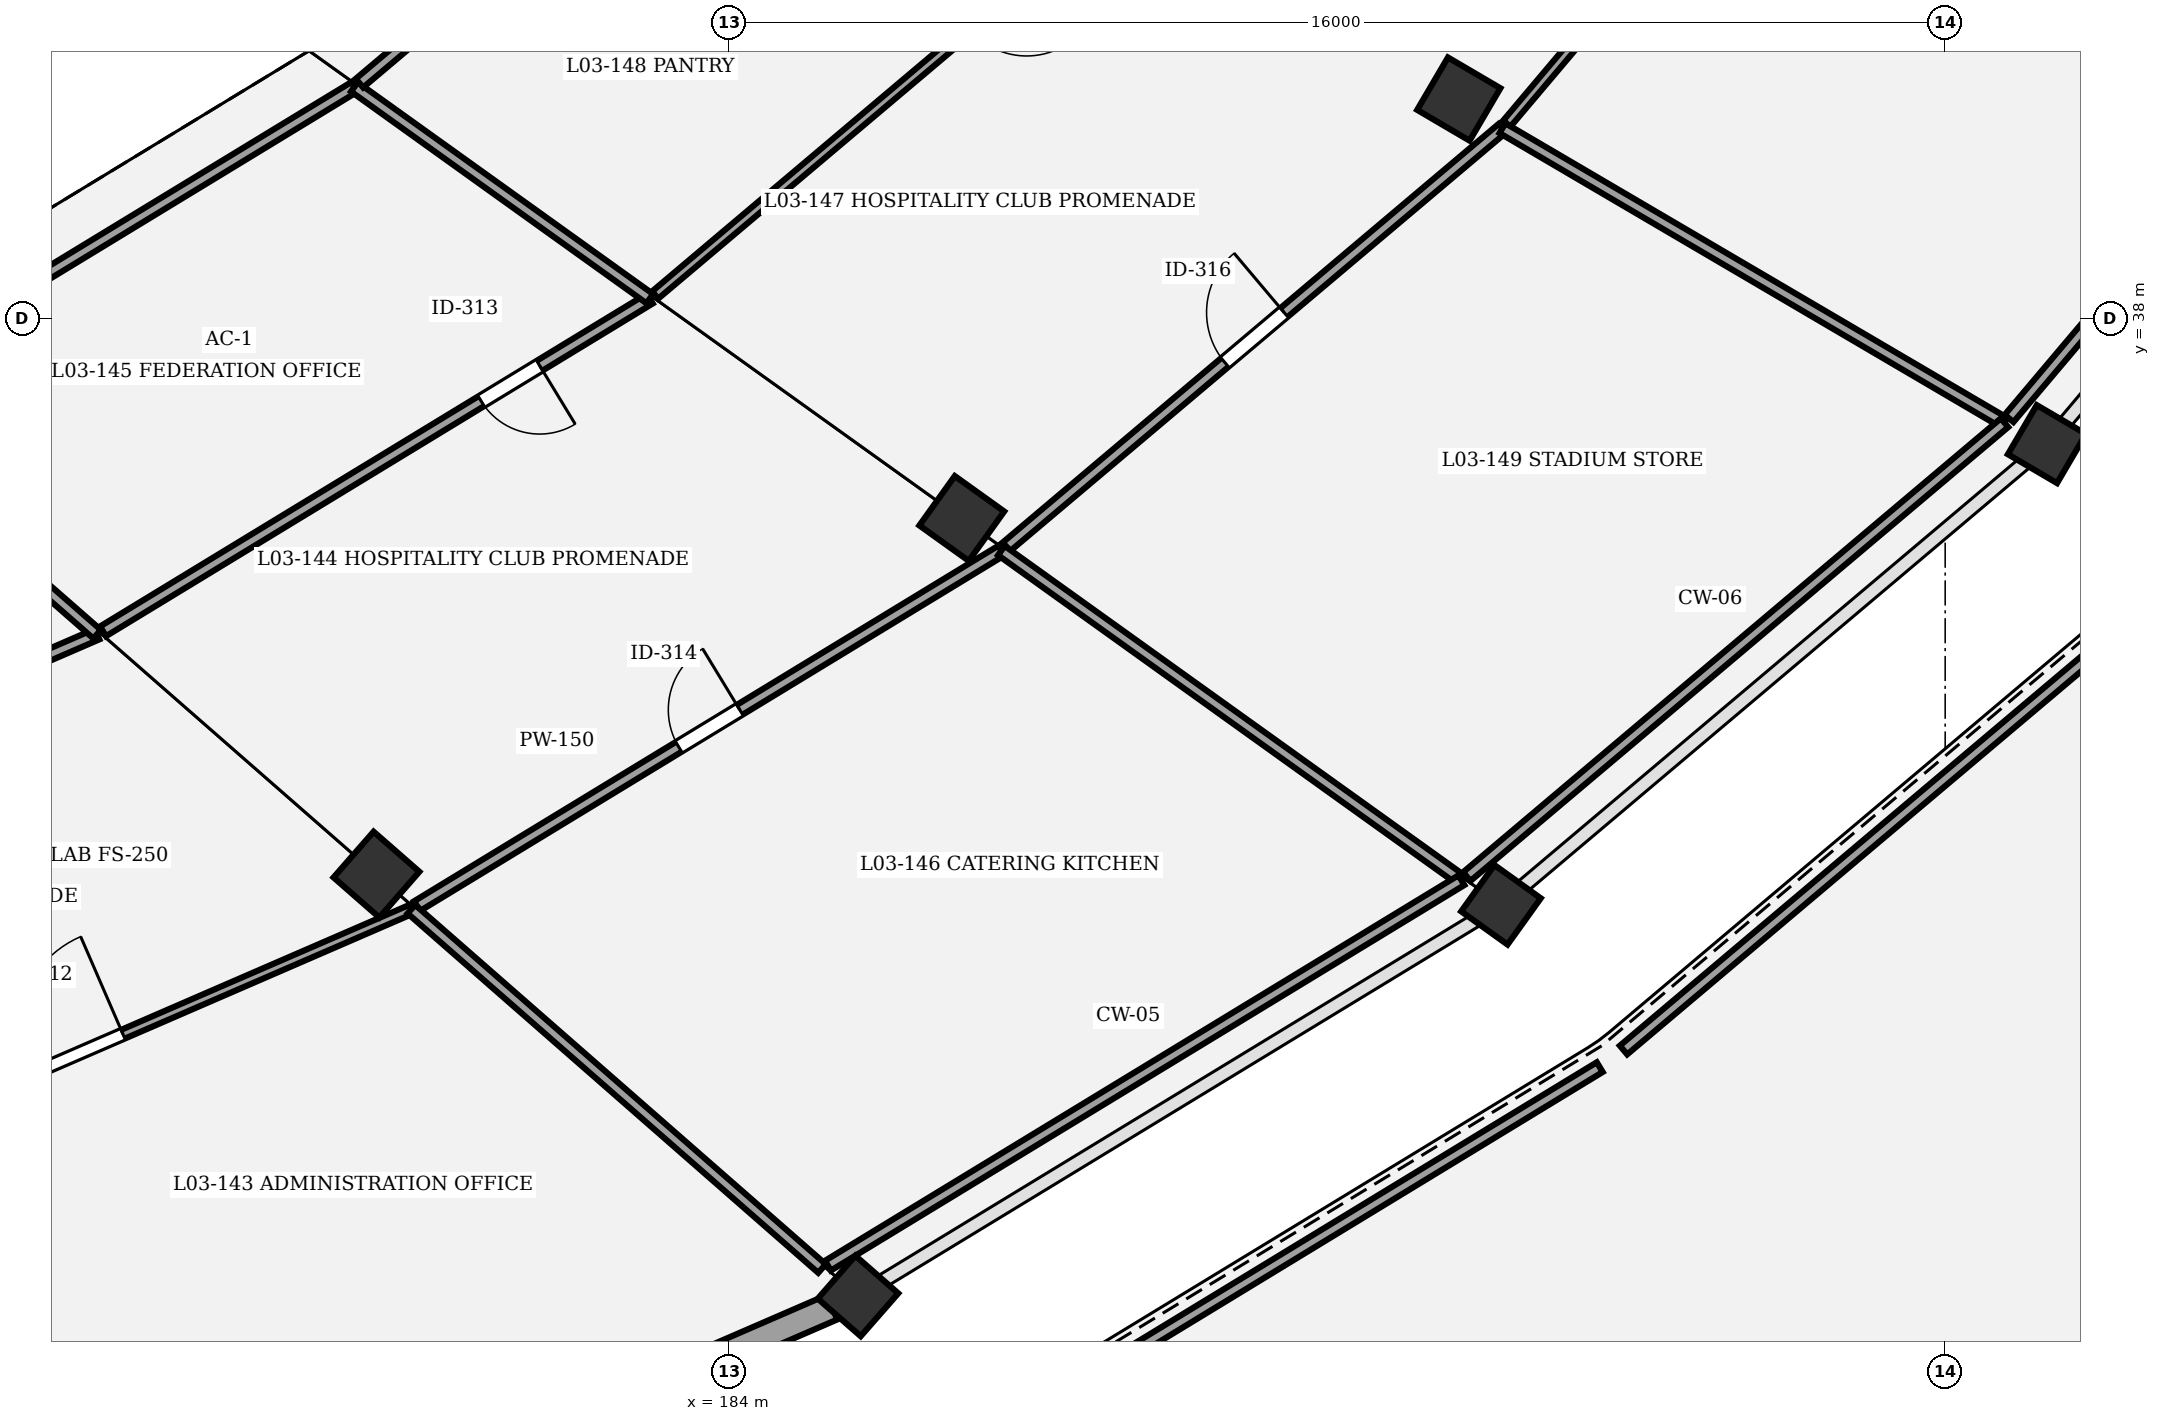
"""IFC4 building model, lengths in metres.
Left out: names, types, materials, properties, quantities, classifications, styles, units other than length and angle.
Written with IfcOpenShell. Run it as: python <this file> out.ifc"""

import sys

from ifc_helpers import new_model, si_unit, direction, frame, frame_2d, origin, origin_2d, place, context, subcontext, project, spatial, rectangle, extrude, element, fill, save


model = new_model("IFC4")
c1 = context("Model", 3, precision=1e-05, world=origin(), true_north=direction((0.0, 1.0)))
c2 = subcontext(c1, "Body", "Model", "MODEL_VIEW")
j1 = project(units=[si_unit("LENGTHUNIT", "METRE"), si_unit("PLANEANGLEUNIT", "RADIAN")], contexts=[c1])
p1 = place(None, origin())
s1 = spatial("IfcSite", under=j1, at=p1, CompositionType="ELEMENT")
p2 = place(p1, origin())
s2 = spatial("IfcBuilding", under=s1, at=p2, CompositionType="ELEMENT")
p3 = place(p2, frame((0.0, 0.0, 14.7)))
s3 = spatial("IfcBuildingStorey", under=s2, at=p3, CompositionType="ELEMENT", Elevation=14.7)
p4 = place(p3, frame((179.36, 30.683, 0.0), z_axis=(0.0, 0.0, 1.0), x_axis=(0.752529860433, -0.658558128912, 0.0)))
e1 = element("IfcColumn", 1, at=p4, inside=s3, PredefinedType="COLUMN", context=c2, shape_type="SweptSolid", body=[
    extrude(rectangle(XDim=0.8, YDim=0.8, at=origin_2d()), origin(), (0.0, 0.0, 1.0), 4.5),
])
p5 = place(p3, frame((185.696, 25.139, 0.0), z_axis=(0.0, 0.0, 1.0), x_axis=(0.752529860433, -0.658558128912, 0.0)))
e2 = element("IfcColumn", 2, at=p5, inside=s3, PredefinedType="COLUMN", context=c2, shape_type="SweptSolid", body=[
    extrude(rectangle(XDim=0.75, YDim=0.75, at=origin_2d()), origin(), (0.0, 0.0, 1.0), 4.5),
])
p6 = place(p3, frame((187.061, 35.368, 0.0), z_axis=(0.0, 0.0, 1.0), x_axis=(0.812897512265, -0.582406760395, 0.0)))
e3 = element("IfcColumn", 3, at=p6, inside=s3, PredefinedType="COLUMN", context=c2, shape_type="SweptSolid", body=[
    extrude(rectangle(XDim=0.8, YDim=0.8, at=origin_2d()), origin(), (0.0, 0.0, 1.0), 4.5),
])
p7 = place(p3, frame((194.156, 30.285, 0.0), z_axis=(0.0, 0.0, 1.0), x_axis=(0.812897512265, -0.582406760395, 0.0)))
e4 = element("IfcColumn", 4, at=p7, inside=s3, PredefinedType="COLUMN", context=c2, shape_type="SweptSolid", body=[
    extrude(rectangle(XDim=0.75, YDim=0.75, at=origin_2d()), origin(), (0.0, 0.0, 1.0), 4.5),
])
p8 = place(p3, frame((193.6, 40.886, 0.0), z_axis=(0.0, 0.0, 1.0), x_axis=(0.862513669207, -0.506033764121, 0.0)))
e5 = element("IfcColumn", 5, at=p8, inside=s3, PredefinedType="COLUMN", context=c2, shape_type="SweptSolid", body=[
    extrude(rectangle(XDim=0.8, YDim=0.8, at=origin_2d()), origin(), (0.0, 0.0, 1.0), 4.5),
])
p9 = place(p3, frame((201.338, 36.346, 0.0), z_axis=(0.0, 0.0, 1.0), x_axis=(0.862513669207, -0.506033764121, 0.0)))
e6 = element("IfcColumn", 6, at=p9, inside=s3, PredefinedType="COLUMN", context=c2, shape_type="SweptSolid", body=[
    extrude(rectangle(XDim=0.75, YDim=0.75, at=origin_2d()), origin(), (0.0, 0.0, 1.0), 4.5),
])
p10 = place(p3, frame((185.354, 24.991, 0.0), z_axis=(0.0, 0.0, 1.0), x_axis=(-0.917502782842, -0.397729359587, 0.0)))
e7 = element("IfcWall", 7, at=p10, inside=s3, PredefinedType="STANDARD", context=c2, shape_type="SweptSolid", body=[
    extrude(rectangle(XDim=9.89, YDim=0.35, at=frame_2d((4.945, 0.0))), origin(), (0.0, 0.0, 1.0), 3.42),
])
p11 = place(p10, frame((4.045, 0.0, 0.0)))
e8 = element("IfcOpeningElement", 8, at=p11, cuts=e7, PredefinedType="OPENING", context=c2, shape_type="SweptSolid", body=[
    extrude(rectangle(XDim=1.8, YDim=2.4, at=frame_2d((0.9, 1.2))), frame((0.0, 0.185, 0.0), z_axis=(0.0, -1.0, 0.0), x_axis=(1.0, 0.0, 0.0)), (0.0, 0.0, 1.0), 0.37),
])
p12 = place(p3, frame((175.685, 33.846, 0.0), z_axis=(0.0, 0.0, 1.0), x_axis=(-0.917494590455, -0.397748257677, 0.0)))
e9 = element("IfcWall", 9, at=p12, inside=s3, PredefinedType="PARTITIONING", context=c2, shape_type="SweptSolid", body=[
    extrude(rectangle(XDim=9.049, YDim=0.15, at=frame_2d((4.525, 0.0))), origin(), (0.0, 0.0, 1.0), 3.25),
])
p13 = place(p12, frame((1.738, 0.0, 0.0)))
e10 = element("IfcOpeningElement", 10, at=p13, cuts=e9, PredefinedType="OPENING", context=c2, shape_type="SweptSolid", body=[
    extrude(rectangle(XDim=1.32, YDim=2.2, at=frame_2d((0.66, 1.1))), frame((0.0, 0.085, 0.0), z_axis=(0.0, -1.0, 0.0), x_axis=(1.0, 0.0, 0.0)), (0.0, 0.0, 1.0), 0.17),
])
p14 = place(p3, frame((170.946, 26.381, 0.0), z_axis=(0.0, 0.0, 1.0), x_axis=(0.917508957037, 0.39771511633, 0.0)))
e11 = element("IfcWall", 11, at=p14, inside=s3, PredefinedType="PARTITIONING", context=c2, shape_type="SweptSolid", body=[
    extrude(rectangle(XDim=9.671, YDim=0.125, at=frame_2d((4.836, 0.0))), origin(), (0.0, 0.0, 1.0), 3.25),
])
p15 = place(p14, frame((4.136, 0.0, 0.0)))
e12 = element("IfcOpeningElement", 12, at=p15, cuts=e11, PredefinedType="OPENING", context=c2, shape_type="SweptSolid", body=[
    extrude(rectangle(XDim=1.4, YDim=2.2, at=frame_2d((0.7, 1.1))), frame((0.0, 0.073, 0.0), z_axis=(0.0, -1.0, 0.0), x_axis=(1.0, 0.0, 0.0)), (0.0, 0.0, 1.0), 0.145),
])
p16 = place(p3, frame((182.957, 38.26, 0.0), z_axis=(0.0, 0.0, 1.0), x_axis=(-0.854330104408, -0.519730769439, 0.0)))
e13 = element("IfcWall", 13, at=p16, inside=s3, PredefinedType="PARTITIONING", context=c2, shape_type="SweptSolid", body=[
    extrude(rectangle(XDim=8.42, YDim=0.15, at=frame_2d((4.21, 0.0))), origin(), (0.0, 0.0, 1.0), 3.25),
])
p17 = place(p16, frame((1.696, 0.0, 0.0)))
e14 = element("IfcOpeningElement", 14, at=p17, cuts=e13, PredefinedType="OPENING", context=c2, shape_type="SweptSolid", body=[
    extrude(rectangle(XDim=0.9, YDim=2.3, at=frame_2d((0.45, 1.15))), frame((0.0, 0.085, 0.0), z_axis=(0.0, -1.0, 0.0), x_axis=(1.0, 0.0, 0.0)), (0.0, 0.0, 1.0), 0.17),
])
p18 = place(p3, frame((179.895, 30.269, 0.0), z_axis=(0.0, 0.0, 1.0), x_axis=(0.854321649351, 0.519744667554, 0.0)))
e15 = element("IfcWall", 15, at=p18, inside=s3, PredefinedType="PARTITIONING", context=c2, shape_type="SweptSolid", body=[
    extrude(rectangle(XDim=8.999, YDim=0.15, at=frame_2d((4.499, 0.0))), origin(), (0.0, 0.0, 1.0), 3.25),
])
p19 = place(p18, frame((4.029, 0.0, 0.0)))
e16 = element("IfcOpeningElement", 16, at=p19, cuts=e15, PredefinedType="OPENING", context=c2, shape_type="SweptSolid", body=[
    extrude(rectangle(XDim=0.94, YDim=2.3, at=frame_2d((0.47, 1.15))), frame((0.0, 0.085, 0.0), z_axis=(0.0, -1.0, 0.0), x_axis=(1.0, 0.0, 0.0)), (0.0, 0.0, 1.0), 0.17),
])
p20 = place(p3, frame((189.133, 43.461, 0.0), z_axis=(0.0, 0.0, 1.0), x_axis=(-0.764249122867, -0.644921141068, 0.0)))
e17 = element("IfcWall", 17, at=p20, inside=s3, PredefinedType="PARTITIONING", context=c2, shape_type="SweptSolid", body=[
    extrude(rectangle(XDim=7.99, YDim=0.125, at=frame_2d((3.995, 0.0))), origin(), (0.0, 0.0, 1.0), 3.25),
])
p21 = place(p20, frame((1.594, 0.0, 0.0)))
e18 = element("IfcOpeningElement", 18, at=p21, cuts=e17, PredefinedType="OPENING", context=c2, shape_type="SweptSolid", body=[
    extrude(rectangle(XDim=0.98, YDim=2.3, at=frame_2d((0.49, 1.15))), frame((0.0, 0.073, 0.0), z_axis=(0.0, -1.0, 0.0), x_axis=(1.0, 0.0, 0.0)), (0.0, 0.0, 1.0), 0.145),
])
p22 = place(p3, frame((187.649, 34.996, 0.0), z_axis=(0.0, 0.0, 1.0), x_axis=(0.764257572309, 0.644911128117, 0.0)))
e19 = element("IfcWall", 19, at=p22, inside=s3, PredefinedType="PARTITIONING", context=c2, shape_type="SweptSolid", body=[
    extrude(rectangle(XDim=8.539, YDim=0.15, at=frame_2d((4.269, 0.0))), origin(), (0.0, 0.0, 1.0), 3.25),
])
p23 = place(p22, frame((3.759, 0.0, 0.0)))
e20 = element("IfcOpeningElement", 20, at=p23, cuts=e19, PredefinedType="OPENING", context=c2, shape_type="SweptSolid", body=[
    extrude(rectangle(XDim=1.02, YDim=2.3, at=frame_2d((0.51, 1.15))), frame((0.0, 0.085, 0.0), z_axis=(0.0, -1.0, 0.0), x_axis=(1.0, 0.0, 0.0)), (0.0, 0.0, 1.0), 0.17),
])
p24 = place(p3, frame((194.232, 40.562, 0.0), z_axis=(0.0, 0.0, 1.0), x_axis=(0.64516519871, 0.76404310505, 0.0)))
e21 = element("IfcWall", 21, at=p24, inside=s3, PredefinedType="PARTITIONING", context=c2, shape_type="SweptSolid", body=[
    extrude(rectangle(XDim=8.313, YDim=0.125, at=frame_2d((4.157, 0.0))), origin(), (0.0, 0.0, 1.0), 3.25),
])
p25 = place(p24, frame((3.607, 0.0, 0.0)))
e22 = element("IfcOpeningElement", 22, at=p25, cuts=e21, PredefinedType="OPENING", context=c2, shape_type="SweptSolid", body=[
    extrude(rectangle(XDim=1.1, YDim=2.3, at=frame_2d((0.55, 1.15))), frame((0.0, 0.073, 0.0), z_axis=(0.0, -1.0, 0.0), x_axis=(1.0, 0.0, 0.0)), (0.0, 0.0, 1.0), 0.145),
])
p26 = place(p3, frame((171.216, 37.756, 0.0), z_axis=(0.0, 0.0, 1.0), x_axis=(0.752558865068, -0.658524984042, 0.0)))
e23 = element("IfcWall", 23, at=p26, inside=s3, PredefinedType="PARTITIONING", context=c2, shape_type="SweptSolid", body=[
    extrude(rectangle(XDim=5.938, YDim=0.15, at=frame_2d((2.969, 0.0))), origin(), (0.0, 0.0, 1.0), 3.25),
])
p27 = place(p3, frame((179.82, 30.228, 0.0), z_axis=(0.0, 0.0, 1.0), x_axis=(0.752576694707, -0.658504607869, 0.0)))
e24 = element("IfcWall", 24, at=p27, inside=s3, PredefinedType="PARTITIONING", context=c2, shape_type="SweptSolid", body=[
    extrude(rectangle(XDim=7.178, YDim=0.15, at=frame_2d((3.589, 0.0))), origin(), (0.0, 0.0, 1.0), 3.25),
])
p28 = place(p3, frame((172.291, 36.922, 0.0), z_axis=(0.0, 0.0, 1.0), x_axis=(0.854324504961, 0.519739973663, 0.0)))
e25 = element("IfcWall", 25, at=p28, inside=s3, PredefinedType="PARTITIONING", context=c2, shape_type="SweptSolid", body=[
    extrude(rectangle(XDim=7.934, YDim=0.15, at=frame_2d((3.967, 0.0))), origin(), (0.0, 0.0, 1.0), 3.25),
])
p29 = place(p3, frame((179.069, 41.045, 0.0), z_axis=(0.0, 0.0, 1.0), x_axis=(0.812884001359, -0.582425617856, 0.0)))
e26 = element("IfcWall", 26, at=p29, inside=s3, PredefinedType="PARTITIONING", context=c2, shape_type="SweptSolid", body=[
    extrude(rectangle(XDim=4.782, YDim=0.15, at=frame_2d((2.391, 0.0))), origin(), (0.0, 0.0, 1.0), 3.25),
])
p30 = place(p3, frame((187.582, 34.946, 0.0), z_axis=(0.0, 0.0, 1.0), x_axis=(0.812888534941, -0.582419290342, 0.0)))
e27 = element("IfcWall", 27, at=p30, inside=s3, PredefinedType="PARTITIONING", context=c2, shape_type="SweptSolid", body=[
    extrude(rectangle(XDim=7.446, YDim=0.15, at=frame_2d((3.723, 0.0))), origin(), (0.0, 0.0, 1.0), 3.25),
])
p31 = place(p3, frame((193.635, 30.609, 0.0), z_axis=(0.0, 0.0, 1.0), x_axis=(-0.854323689683, -0.519741313777, 0.0)))
e28 = element("IfcWall", 28, at=p31, inside=s3, PredefinedType="PARTITIONING", context=c2, shape_type="SweptSolid", body=[
    extrude(rectangle(XDim=9.756, YDim=0.15, at=frame_2d((4.878, 0.0))), origin(), (0.0, 0.0, 1.0), 3.25),
])
p32 = place(p3, frame((179.136, 41.096, 0.0), z_axis=(0.0, 0.0, 1.0), x_axis=(0.764259013583, 0.644909420118, 0.0)))
e29 = element("IfcWall", 29, at=p32, inside=s3, PredefinedType="PARTITIONING", context=c2, shape_type="SweptSolid", body=[
    extrude(rectangle(XDim=7.528, YDim=0.15, at=frame_2d((3.764, 0.0))), origin(), (0.0, 0.0, 1.0), 3.25),
])
p33 = place(p3, frame((194.175, 40.503, 0.0), z_axis=(0.0, 0.0, 1.0), x_axis=(0.862503200943, -0.506051606422, 0.0)))
e30 = element("IfcWall", 30, at=p33, inside=s3, PredefinedType="PARTITIONING", context=c2, shape_type="SweptSolid", body=[
    extrude(rectangle(XDim=7.659, YDim=0.15, at=frame_2d((3.829, 0.0))), origin(), (0.0, 0.0, 1.0), 3.25),
])
p34 = place(p3, frame((200.781, 36.627, 0.0), z_axis=(0.0, 0.0, 1.0), x_axis=(-0.764252893528, -0.644916672706, 0.0)))
e31 = element("IfcWall", 31, at=p34, inside=s3, PredefinedType="PARTITIONING", context=c2, shape_type="SweptSolid", body=[
    extrude(rectangle(XDim=9.257, YDim=0.15, at=frame_2d((4.629, 0.0))), origin(), (0.0, 0.0, 1.0), 3.25),
])
p35 = place(p3, frame((206.656, 43.572, 0.0), z_axis=(0.0, 0.0, 1.0), x_axis=(-0.645166061073, -0.764042376861, 0.0)))
e32 = element("IfcWall", 32, at=p35, inside=s3, PredefinedType="PARTITIONING", context=c2, shape_type="SweptSolid", body=[
    extrude(rectangle(XDim=9.014, YDim=0.15, at=frame_2d((4.507, 0.0))), origin(), (0.0, 0.0, 1.0), 3.25),
])
p36 = place(p3, frame((186.996, 23.003, 0.0), z_axis=(0.0, 0.0, 1.0), x_axis=(0.854333268174, 0.519725568826, 0.0)))
e33 = element("IfcWall", 33, at=p36, inside=s3, PredefinedType="PARTITIONING", context=c2, shape_type="SweptSolid", body=[
    extrude(rectangle(XDim=9.902, YDim=0.15, at=frame_2d((4.951, 0.0))), origin(), (0.0, 0.0, 1.0), 3.25),
])
p37 = place(p3, frame((195.768, 28.375, 0.0), z_axis=(0.0, 0.0, 1.0), x_axis=(0.76426547638, 0.644901761212, 0.0)))
e34 = element("IfcWall", 34, at=p37, inside=s3, PredefinedType="PARTITIONING", context=c2, shape_type="SweptSolid", body=[
    extrude(rectangle(XDim=9.398, YDim=0.15, at=frame_2d((4.699, 0.0))), origin(), (0.0, 0.0, 1.0), 3.25),
])
p38 = place(p15, origin())
e35 = element("IfcDoor", 35, at=p38, inside=s3, OperationType="SINGLE_SWING_RIGHT", PredefinedType="DOOR", context=c2, shape_type="SweptSolid", body=[
    extrude(rectangle(XDim=1.4, YDim=2.2, at=frame_2d((0.7, 1.1))), frame((0.0, 0.025, 0.0), z_axis=(0.0, -1.0, 0.0), x_axis=(1.0, 0.0, 0.0)), (0.0, 0.0, 1.0), 0.05),
])
fill(e12, e35)
p39 = place(p17, origin())
e36 = element("IfcDoor", 36, at=p39, inside=s3, OperationType="SINGLE_SWING_LEFT", PredefinedType="DOOR", context=c2, shape_type="SweptSolid", body=[
    extrude(rectangle(XDim=0.9, YDim=2.3, at=frame_2d((0.45, 1.15))), frame((0.0, 0.025, 0.0), z_axis=(0.0, -1.0, 0.0), x_axis=(1.0, 0.0, 0.0)), (0.0, 0.0, 1.0), 0.05),
])
fill(e14, e36)
p40 = place(p19, origin())
e37 = element("IfcDoor", 37, at=p40, inside=s3, OperationType="SINGLE_SWING_RIGHT", PredefinedType="DOOR", context=c2, shape_type="SweptSolid", body=[
    extrude(rectangle(XDim=0.94, YDim=2.3, at=frame_2d((0.47, 1.15))), frame((0.0, 0.025, 0.0), z_axis=(0.0, -1.0, 0.0), x_axis=(1.0, 0.0, 0.0)), (0.0, 0.0, 1.0), 0.05),
])
fill(e16, e37)
p41 = place(p23, origin())
e38 = element("IfcDoor", 38, at=p41, inside=s3, OperationType="SINGLE_SWING_RIGHT", PredefinedType="DOOR", context=c2, shape_type="SweptSolid", body=[
    extrude(rectangle(XDim=1.02, YDim=2.3, at=frame_2d((0.51, 1.15))), frame((0.0, 0.025, 0.0), z_axis=(0.0, -1.0, 0.0), x_axis=(1.0, 0.0, 0.0)), (0.0, 0.0, 1.0), 0.05),
])
fill(e20, e38)
save(model, sys.argv[1])
